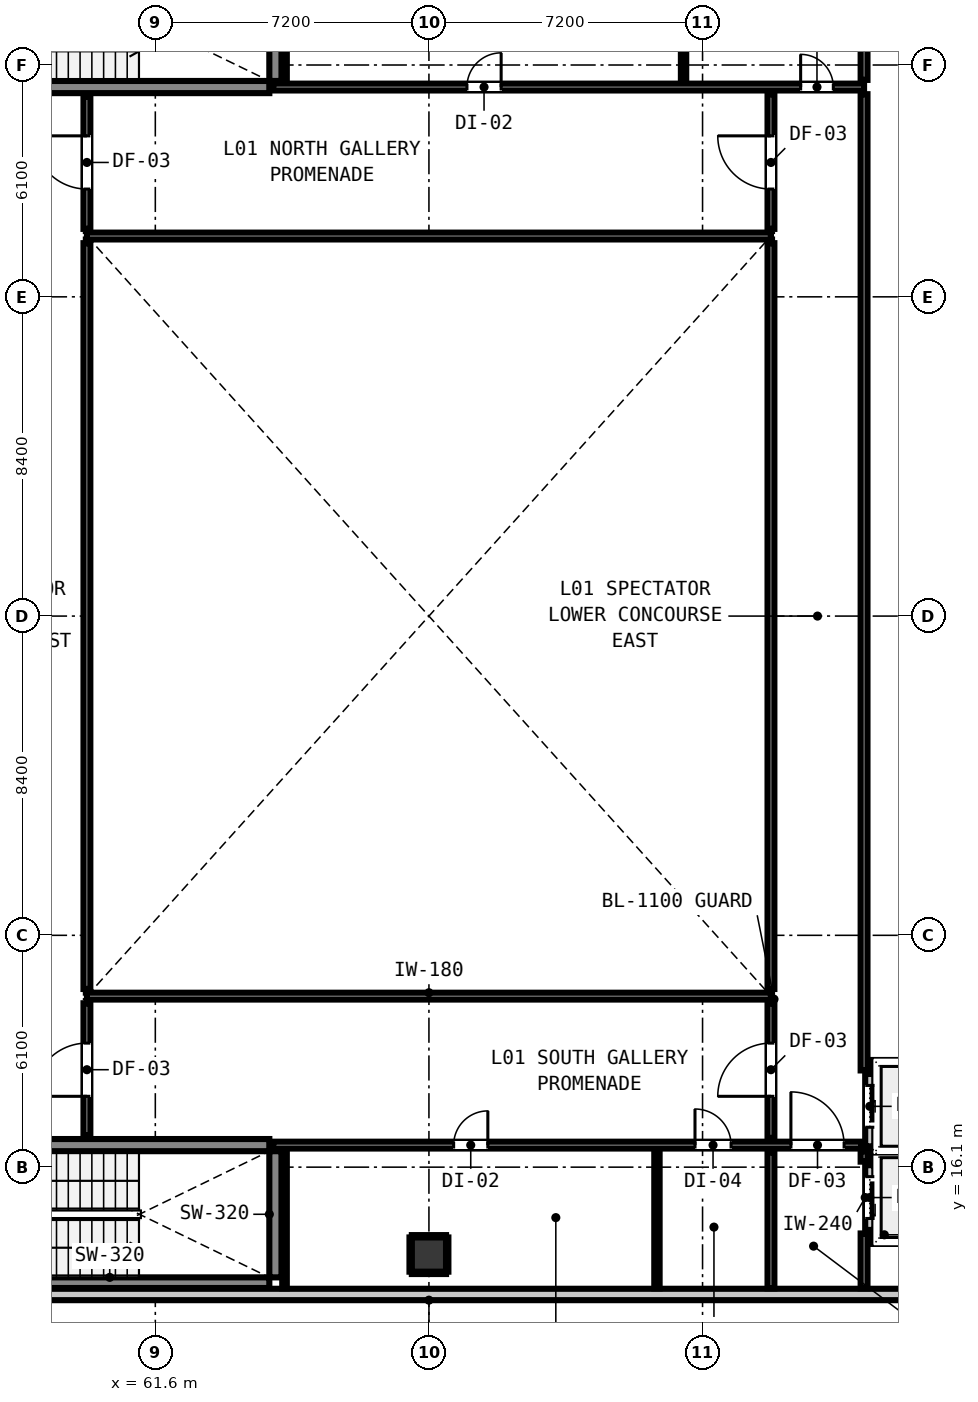
"""IFC4 building model, lengths in metres.
Left out: names, types, materials, properties, quantities, classifications, styles, units other than length and angle.
Written with IfcOpenShell. Run it as: python <this file> out.ifc"""

import sys

from ifc_helpers import new_model, si_unit, direction, frame, frame_2d, origin, origin_2d, place, context, subcontext, project, spatial, rectangle, circle, extrude, element, fill, save


model = new_model("IFC4")
c1 = context("Model", 3, precision=1e-05, world=origin(), true_north=direction((0.0, 1.0)))
c2 = subcontext(c1, "Body", "Model", "MODEL_VIEW")
j1 = project(units=[si_unit("LENGTHUNIT", "METRE"), si_unit("PLANEANGLEUNIT", "RADIAN")], contexts=[c1])
p1 = place(None, origin())
s1 = spatial("IfcSite", under=j1, at=p1, CompositionType="ELEMENT")
p2 = place(p1, origin())
s2 = spatial("IfcBuilding", under=s1, at=p2, CompositionType="ELEMENT")
p3 = place(p2, frame((0.0, 0.0, 5.2)))
s3 = spatial("IfcBuildingStorey", under=s2, at=p3, CompositionType="ELEMENT", Elevation=5.2)
p4 = place(p3, frame((64.76, 13.2, 0.0), z_axis=(0.0, 0.0, 1.0), x_axis=(0.0, 1.0, 0.0)))
e1 = element("IfcWall", 1, at=p4, inside=s3, PredefinedType="SHEAR", context=c2, shape_type="SweptSolid", body=[
    extrude(rectangle(XDim=3.32, YDim=0.32, at=frame_2d((1.66, 0.0))), origin(), (0.0, 0.0, 1.0), 4.2),
])
p5 = place(p3, frame((56.2, 13.06, 0.0), z_axis=(0.0, 0.0, 1.0), x_axis=(1.0, 0.0, 0.0)))
e2 = element("IfcWall", 2, at=p5, inside=s3, PredefinedType="SHEAR", context=c2, shape_type="SweptSolid", body=[
    extrude(rectangle(XDim=8.4, YDim=0.28, at=frame_2d((4.2, 0.0))), origin(), (0.0, 0.0, 1.0), 4.2),
])
p6 = place(p3, frame((56.2, 16.68, 0.0), z_axis=(0.0, 0.0, 1.0), x_axis=(1.0, 0.0, 0.0)))
e3 = element("IfcWall", 3, at=p6, inside=s3, PredefinedType="SHEAR", context=c2, shape_type="SweptSolid", body=[
    extrude(rectangle(XDim=8.4, YDim=0.32, at=frame_2d((4.2, 0.0))), origin(), (0.0, 0.0, 1.0), 4.2),
])
p7 = place(p6, frame((0.23, 0.0, 0.0)))
e4 = element("IfcOpeningElement", 4, at=p7, cuts=e3, PredefinedType="OPENING", context=c2, shape_type="SweptSolid", body=[
    extrude(rectangle(XDim=1.1, YDim=2.15, at=frame_2d((0.55, 1.075))), frame((0.0, 0.17, 0.0), z_axis=(0.0, -1.0, 0.0), x_axis=(1.0, 0.0, 0.0)), (0.0, 0.0, 1.0), 0.34),
])
p8 = place(p3, frame((64.76, 44.68, 0.0), z_axis=(0.0, 0.0, 1.0), x_axis=(0.0, 1.0, 0.0)))
e5 = element("IfcWall", 5, at=p8, inside=s3, PredefinedType="SHEAR", context=c2, shape_type="SweptSolid", body=[
    extrude(rectangle(XDim=3.32, YDim=0.32, at=frame_2d((1.66, 0.0))), origin(), (0.0, 0.0, 1.0), 4.2),
])
p9 = place(p3, frame((56.2, 44.52, 0.0), z_axis=(0.0, 0.0, 1.0), x_axis=(1.0, 0.0, 0.0)))
e6 = element("IfcWall", 6, at=p9, inside=s3, PredefinedType="SHEAR", context=c2, shape_type="SweptSolid", body=[
    extrude(rectangle(XDim=8.4, YDim=0.32, at=frame_2d((4.2, 0.0))), origin(), (0.0, 0.0, 1.0), 4.2),
])
p10 = place(p9, frame((0.23, 0.0, 0.0)))
e7 = element("IfcOpeningElement", 7, at=p10, cuts=e6, PredefinedType="OPENING", context=c2, shape_type="SweptSolid", body=[
    extrude(rectangle(XDim=1.1, YDim=2.15, at=frame_2d((0.55, 1.075))), frame((0.0, 0.17, 0.0), z_axis=(0.0, -1.0, 0.0), x_axis=(1.0, 0.0, 0.0)), (0.0, 0.0, 1.0), 0.34),
])
p11 = place(p3, frame((68.8, 13.8, 0.0), z_axis=(0.0, 0.0, 1.0), x_axis=(1.0, 0.0, 0.0)))
e8 = element("IfcColumn", 8, at=p11, inside=s3, PredefinedType="COLUMN", context=c2, shape_type="SweptSolid", body=[
    extrude(circle(Radius=0.45, at=origin_2d()), origin(), (0.0, 0.0, 1.0), 4.2),
])
p12 = place(p3, frame((83.05, 12.75, 0.0), z_axis=(0.0, 0.0, 1.0), x_axis=(-1.0, 0.0, 0.0)))
e9 = element("IfcWall", 9, at=p12, inside=s3, PredefinedType="STANDARD", context=c2, shape_type="SweptSolid", body=[
    extrude(rectangle(XDim=28.5, YDim=0.3, at=frame_2d((14.25, 0.0))), origin(), (0.0, 0.0, 1.0), 3.92),
])
p13 = place(p3, frame((80.4, 14.2, 0.0), z_axis=(0.0, 0.0, 1.0), x_axis=(1.0, 0.0, 0.0)))
e10 = element("IfcWall", 10, at=p13, inside=s3, PredefinedType="PARTITIONING", context=c2, shape_type="SweptSolid", body=[
    extrude(rectangle(XDim=0.768, YDim=0.24, at=frame_2d((0.384, 0.0))), origin(), (0.0, 0.0, 1.0), 3.155),
])
p14 = place(p3, frame((80.4, 16.4, 0.0), z_axis=(0.0, 0.0, 1.0), x_axis=(1.0, 0.0, 0.0)))
e11 = element("IfcWall", 11, at=p14, inside=s3, PredefinedType="PARTITIONING", context=c2, shape_type="SweptSolid", body=[
    extrude(rectangle(XDim=2.2, YDim=0.24, at=frame_2d((1.1, 0.0))), origin(), (0.0, 0.0, 1.0), 3.92),
])
p15 = place(p3, frame((80.4, 14.448, 0.0), z_axis=(0.0, 0.0, 1.0), x_axis=(0.0, 1.0, 0.0)))
e12 = element("IfcWall", 12, at=p15, inside=s3, PredefinedType="PARTITIONING", context=c2, shape_type="SweptSolid", body=[
    extrude(rectangle(XDim=1.704, YDim=0.24, at=frame_2d((0.852, 0.0))), origin(), (0.0, 0.0, 1.0), 3.92),
])
p16 = place(p15, frame((0.302, 0.0, 0.0)))
e13 = element("IfcOpeningElement", 13, at=p16, cuts=e12, PredefinedType="OPENING", context=c2, shape_type="SweptSolid", body=[
    extrude(rectangle(XDim=1.1, YDim=2.15, at=frame_2d((0.55, 1.075))), frame((0.0, 0.13, 0.0), z_axis=(0.0, -1.0, 0.0), x_axis=(1.0, 0.0, 0.0)), (0.0, 0.0, 1.0), 0.26),
])
p17 = place(p3, frame((80.4, 18.8, 0.0), z_axis=(0.0, 0.0, 1.0), x_axis=(1.0, 0.0, 0.0)))
e14 = element("IfcWall", 14, at=p17, inside=s3, PredefinedType="PARTITIONING", context=c2, shape_type="SweptSolid", body=[
    extrude(rectangle(XDim=2.2, YDim=0.24, at=frame_2d((1.1, 0.0))), origin(), (0.0, 0.0, 1.0), 3.92),
])
p18 = place(p3, frame((80.4, 16.648, 0.0), z_axis=(0.0, 0.0, 1.0), x_axis=(0.0, 1.0, 0.0)))
e15 = element("IfcWall", 15, at=p18, inside=s3, PredefinedType="PARTITIONING", context=c2, shape_type="SweptSolid", body=[
    extrude(rectangle(XDim=1.904, YDim=0.24, at=frame_2d((0.952, 0.0))), origin(), (0.0, 0.0, 1.0), 3.92),
])
p19 = place(p18, frame((0.502, 0.0, 0.0)))
e16 = element("IfcOpeningElement", 16, at=p19, cuts=e15, PredefinedType="OPENING", context=c2, shape_type="SweptSolid", body=[
    extrude(rectangle(XDim=1.1, YDim=2.15, at=frame_2d((0.55, 1.075))), frame((0.0, 0.13, 0.0), z_axis=(0.0, -1.0, 0.0), x_axis=(1.0, 0.0, 0.0)), (0.0, 0.0, 1.0), 0.26),
])
p20 = place(p3, frame((64.7, 16.68, 0.0), z_axis=(0.0, 0.0, 1.0), x_axis=(1.0, 0.0, 0.0)))
e17 = element("IfcWall", 17, at=p20, inside=s3, PredefinedType="PARTITIONING", context=c2, shape_type="SweptSolid", body=[
    extrude(rectangle(XDim=15.482, YDim=0.18, at=frame_2d((7.741, 0.0))), origin(), (0.0, 0.0, 1.0), 3.92),
])
p21 = place(p20, frame((13.625, 0.0, 0.0)))
e18 = element("IfcOpeningElement", 18, at=p21, cuts=e17, PredefinedType="OPENING", context=c2, shape_type="SweptSolid", body=[
    extrude(rectangle(XDim=1.4, YDim=2.15, at=frame_2d((0.7, 1.075))), frame((0.0, 0.1, 0.0), z_axis=(0.0, -1.0, 0.0), x_axis=(1.0, 0.0, 0.0)), (0.0, 0.0, 1.0), 0.2),
])
p22 = place(p20, frame((4.75, 0.0, 0.0)))
e19 = element("IfcOpeningElement", 19, at=p22, cuts=e17, PredefinedType="OPENING", context=c2, shape_type="SweptSolid", body=[
    extrude(rectangle(XDim=0.9, YDim=2.1, at=frame_2d((0.45, 1.05))), frame((0.0, 0.1, 0.0), z_axis=(0.0, -1.0, 0.0), x_axis=(1.0, 0.0, 0.0)), (0.0, 0.0, 1.0), 0.2),
])
p23 = place(p20, frame((11.101, 0.0, 0.0)))
e20 = element("IfcOpeningElement", 20, at=p23, cuts=e17, PredefinedType="OPENING", context=c2, shape_type="SweptSolid", body=[
    extrude(rectangle(XDim=0.95, YDim=2.1, at=frame_2d((0.475, 1.05))), frame((0.0, 0.1, 0.0), z_axis=(0.0, -1.0, 0.0), x_axis=(1.0, 0.0, 0.0)), (0.0, 0.0, 1.0), 0.2),
])
for number, where, z_axis, x_axis in (
    (21, (59.8, 20.6, 0.0), (0.0, 0.0, 1.0), (1.0, 0.0, 0.0)),
    (22, (59.8, 40.6, 0.0), (0.0, 0.0, 1.0), (1.0, 0.0, 0.0)),
):
    element("IfcWall", number, at=place(p3, frame(where, z_axis=z_axis, x_axis=x_axis)), inside=s3, PredefinedType="PARTITIONING", context=c2, shape_type="SweptSolid", body=[
        extrude(rectangle(XDim=18.0, YDim=0.18, at=frame_2d((9.0, 0.0))), origin(), (0.0, 0.0, 1.0), 3.92),
    ])
p24 = place(p3, frame((64.7, 44.52, 0.0), z_axis=(0.0, 0.0, 1.0), x_axis=(1.0, 0.0, 0.0)))
e23 = element("IfcWall", 23, at=p24, inside=s3, PredefinedType="PARTITIONING", context=c2, shape_type="SweptSolid", body=[
    extrude(rectangle(XDim=15.55, YDim=0.18, at=frame_2d((7.775, 0.0))), origin(), (0.0, 0.0, 1.0), 3.92),
])
p25 = place(p24, frame((5.1, 0.0, 0.0)))
e24 = element("IfcOpeningElement", 24, at=p25, cuts=e23, PredefinedType="OPENING", context=c2, shape_type="SweptSolid", body=[
    extrude(rectangle(XDim=0.9, YDim=2.1, at=frame_2d((0.45, 1.05))), frame((0.0, 0.1, 0.0), z_axis=(0.0, -1.0, 0.0), x_axis=(1.0, 0.0, 0.0)), (0.0, 0.0, 1.0), 0.2),
])
p26 = place(p24, frame((13.881, 0.0, 0.0)))
e25 = element("IfcOpeningElement", 25, at=p26, cuts=e23, PredefinedType="OPENING", context=c2, shape_type="SweptSolid", body=[
    extrude(rectangle(XDim=0.86, YDim=2.02, at=frame_2d((0.43, 1.01))), frame((0.0, 0.1, 0.0), z_axis=(0.0, -1.0, 0.0), x_axis=(1.0, 0.0, 0.0)), (0.0, 0.0, 1.0), 0.2),
])
p27 = place(p3, frame((59.8, 16.94, 0.0), z_axis=(0.0, 0.0, 1.0), x_axis=(0.0, 1.0, 0.0)))
e26 = element("IfcWall", 26, at=p27, inside=s3, PredefinedType="PARTITIONING", context=c2, shape_type="SweptSolid", body=[
    extrude(rectangle(XDim=3.472, YDim=0.18, at=frame_2d((1.736, 0.0))), origin(), (0.0, 0.0, 1.0), 3.92),
])
p28 = place(p27, frame((1.024, 0.0, 0.0)))
e27 = element("IfcOpeningElement", 27, at=p28, cuts=e26, PredefinedType="OPENING", context=c2, shape_type="SweptSolid", body=[
    extrude(rectangle(XDim=1.4, YDim=2.15, at=frame_2d((0.7, 1.075))), frame((0.0, 0.1, 0.0), z_axis=(0.0, -1.0, 0.0), x_axis=(1.0, 0.0, 0.0)), (0.0, 0.0, 1.0), 0.2),
])
p29 = place(p3, frame((59.8, 20.788, 0.0), z_axis=(0.0, 0.0, 1.0), x_axis=(0.0, 1.0, 0.0)))
e28 = element("IfcWall", 28, at=p29, inside=s3, PredefinedType="PARTITIONING", context=c2, shape_type="SweptSolid", body=[
    extrude(rectangle(XDim=19.624, YDim=0.18, at=frame_2d((9.812, 0.0))), origin(), (0.0, 0.0, 1.0), 3.92),
])
p30 = place(p3, frame((59.8, 40.788, 0.0), z_axis=(0.0, 0.0, 1.0), x_axis=(0.0, 1.0, 0.0)))
e29 = element("IfcWall", 29, at=p30, inside=s3, PredefinedType="PARTITIONING", context=c2, shape_type="SweptSolid", body=[
    extrude(rectangle(XDim=3.472, YDim=0.18, at=frame_2d((1.736, 0.0))), origin(), (0.0, 0.0, 1.0), 3.92),
])
p31 = place(p30, frame((1.048, 0.0, 0.0)))
e30 = element("IfcOpeningElement", 30, at=p31, cuts=e29, PredefinedType="OPENING", context=c2, shape_type="SweptSolid", body=[
    extrude(rectangle(XDim=1.4, YDim=2.15, at=frame_2d((0.7, 1.075))), frame((0.0, 0.1, 0.0), z_axis=(0.0, -1.0, 0.0), x_axis=(1.0, 0.0, 0.0)), (0.0, 0.0, 1.0), 0.2),
])
p32 = place(p3, frame((77.8, 12.912, 0.0), z_axis=(0.0, 0.0, 1.0), x_axis=(0.0, 1.0, 0.0)))
e31 = element("IfcWall", 31, at=p32, inside=s3, PredefinedType="PARTITIONING", context=c2, shape_type="SweptSolid", body=[
    extrude(rectangle(XDim=3.58, YDim=0.18, at=frame_2d((1.79, 0.0))), origin(), (0.0, 0.0, 1.0), 3.92),
])
p33 = place(p3, frame((77.8, 16.868, 0.0), z_axis=(0.0, 0.0, 1.0), x_axis=(0.0, 1.0, 0.0)))
e32 = element("IfcWall", 32, at=p33, inside=s3, PredefinedType="PARTITIONING", context=c2, shape_type="SweptSolid", body=[
    extrude(rectangle(XDim=3.544, YDim=0.18, at=frame_2d((1.772, 0.0))), origin(), (0.0, 0.0, 1.0), 3.92),
])
p34 = place(p33, frame((1.096, 0.0, 0.0)))
e33 = element("IfcOpeningElement", 33, at=p34, cuts=e32, PredefinedType="OPENING", context=c2, shape_type="SweptSolid", body=[
    extrude(rectangle(XDim=1.4, YDim=2.15, at=frame_2d((0.7, 1.075))), frame((0.0, 0.1, 0.0), z_axis=(0.0, -1.0, 0.0), x_axis=(1.0, 0.0, 0.0)), (0.0, 0.0, 1.0), 0.2),
])
p35 = place(p3, frame((77.8, 20.788, 0.0), z_axis=(0.0, 0.0, 1.0), x_axis=(0.0, 1.0, 0.0)))
e34 = element("IfcWall", 34, at=p35, inside=s3, PredefinedType="PARTITIONING", context=c2, shape_type="SweptSolid", body=[
    extrude(rectangle(XDim=19.624, YDim=0.18, at=frame_2d((9.812, 0.0))), origin(), (0.0, 0.0, 1.0), 3.92),
])
p36 = place(p3, frame((77.8, 40.788, 0.0), z_axis=(0.0, 0.0, 1.0), x_axis=(0.0, 1.0, 0.0)))
e35 = element("IfcWall", 35, at=p36, inside=s3, PredefinedType="PARTITIONING", context=c2, shape_type="SweptSolid", body=[
    extrude(rectangle(XDim=3.544, YDim=0.18, at=frame_2d((1.772, 0.0))), origin(), (0.0, 0.0, 1.0), 3.92),
])
p37 = place(p36, frame((1.048, 0.0, 0.0)))
e36 = element("IfcOpeningElement", 36, at=p37, cuts=e35, PredefinedType="OPENING", context=c2, shape_type="SweptSolid", body=[
    extrude(rectangle(XDim=1.4, YDim=2.15, at=frame_2d((0.7, 1.075))), frame((0.0, 0.1, 0.0), z_axis=(0.0, -1.0, 0.0), x_axis=(1.0, 0.0, 0.0)), (0.0, 0.0, 1.0), 0.2),
])
p38 = place(p3, frame((80.25, 12.912, 0.0), z_axis=(0.0, 0.0, 1.0), x_axis=(0.0, 1.0, 0.0)))
e37 = element("IfcWall", 37, at=p38, inside=s3, PredefinedType="PARTITIONING", context=c2, shape_type="SweptSolid", body=[
    extrude(rectangle(XDim=1.443, YDim=0.18, at=frame_2d((0.721, 0.0))), origin(), (0.0, 0.0, 1.0), 3.92),
])
p39 = place(p3, frame((80.25, 16.245, 0.0), z_axis=(0.0, 0.0, 1.0), x_axis=(0.0, 1.0, 0.0)))
e38 = element("IfcWall", 38, at=p39, inside=s3, PredefinedType="PARTITIONING", context=c2, shape_type="SweptSolid", body=[
    extrude(rectangle(XDim=0.275, YDim=0.18, at=frame_2d((0.137, 0.0))), origin(), (0.0, 0.0, 1.0), 3.92),
])
p40 = place(p3, frame((80.25, 18.645, 0.0), z_axis=(0.0, 0.0, 1.0), x_axis=(0.0, 1.0, 0.0)))
e39 = element("IfcWall", 39, at=p40, inside=s3, PredefinedType="PARTITIONING", context=c2, shape_type="SweptSolid", body=[
    extrude(rectangle(XDim=25.687, YDim=0.18, at=frame_2d((12.844, 0.0))), origin(), (0.0, 0.0, 1.0), 3.92),
])
p41 = place(p3, frame((80.25, 44.708, 0.0), z_axis=(0.0, 0.0, 1.0), x_axis=(0.0, 1.0, 0.0)))
e40 = element("IfcWall", 40, at=p41, inside=s3, PredefinedType="PARTITIONING", context=c2, shape_type="SweptSolid", body=[
    extrude(rectangle(XDim=3.58, YDim=0.18, at=frame_2d((1.79, 0.0))), origin(), (0.0, 0.0, 1.0), 3.92),
])
p42 = place(p3, frame((74.8, 12.912, 0.0), z_axis=(0.0, 0.0, 1.0), x_axis=(0.0, 1.0, 0.0)))
e41 = element("IfcWall", 41, at=p42, inside=s3, PredefinedType="PARTITIONING", context=c2, shape_type="SweptSolid", body=[
    extrude(rectangle(XDim=3.6, YDim=0.14, at=frame_2d((1.8, 0.0))), origin(), (0.0, 0.0, 1.0), 3.92),
])
p43 = place(p3, frame((75.5, 44.688, 0.0), z_axis=(0.0, 0.0, 1.0), x_axis=(0.0, 1.0, 0.0)))
e42 = element("IfcWall", 42, at=p43, inside=s3, PredefinedType="PARTITIONING", context=c2, shape_type="SweptSolid", body=[
    extrude(rectangle(XDim=3.6, YDim=0.14, at=frame_2d((1.8, 0.0))), origin(), (0.0, 0.0, 1.0), 3.92),
])
p44 = place(p3, frame((65.0, 12.912, 0.0), z_axis=(0.0, 0.0, 1.0), x_axis=(0.0, 1.0, 0.0)))
e43 = element("IfcWall", 43, at=p44, inside=s3, PredefinedType="PARTITIONING", context=c2, shape_type="SweptSolid", body=[
    extrude(rectangle(XDim=3.61, YDim=0.12, at=frame_2d((1.805, 0.0))), origin(), (0.0, 0.0, 1.0), 3.92),
])
p45 = place(p3, frame((65.0, 44.678, 0.0), z_axis=(0.0, 0.0, 1.0), x_axis=(0.0, 1.0, 0.0)))
e44 = element("IfcWall", 44, at=p45, inside=s3, PredefinedType="PARTITIONING", context=c2, shape_type="SweptSolid", body=[
    extrude(rectangle(XDim=3.61, YDim=0.12, at=frame_2d((1.805, 0.0))), origin(), (0.0, 0.0, 1.0), 3.92),
])
for number, where, z_axis, x_axis in (
    (45, (68.35, 13.318, 0.0), (0.0, 0.0, 1.0), (1.0, 0.0, 0.0)),
    (46, (68.35, 14.282, 0.0), (0.0, 0.0, 1.0), (1.0, 0.0, 0.0)),
    (47, (68.318, 13.35, 0.0), (0.0, 0.0, 1.0), (0.0, 1.0, 0.0)),
    (48, (69.282, 13.35, 0.0), (0.0, 0.0, 1.0), (0.0, 1.0, 0.0)),
):
    element("IfcWall", number, at=place(p3, frame(where, z_axis=z_axis, x_axis=x_axis)), inside=s3, PredefinedType="PARTITIONING", context=c2, shape_type="SweptSolid", body=[
        extrude(rectangle(XDim=0.9, YDim=0.06, at=frame_2d((0.45, 0.0))), origin(), (0.0, 0.0, 1.0), 1.45),
    ])
p46 = place(p16, origin())
e49 = element("IfcDoor", 49, at=p46, inside=s3, OperationType="SLIDING_TO_LEFT", PredefinedType="DOOR", context=c2, shape_type="SweptSolid", body=[
    extrude(rectangle(XDim=1.1, YDim=2.15, at=frame_2d((0.55, 1.075))), frame((0.0, 0.025, 0.0), z_axis=(0.0, -1.0, 0.0), x_axis=(1.0, 0.0, 0.0)), (0.0, 0.0, 1.0), 0.05),
])
fill(e13, e49)
p47 = place(p19, origin())
e50 = element("IfcDoor", 50, at=p47, inside=s3, OperationType="SLIDING_TO_RIGHT", PredefinedType="DOOR", context=c2, shape_type="SweptSolid", body=[
    extrude(rectangle(XDim=1.1, YDim=2.15, at=frame_2d((0.55, 1.075))), frame((0.0, 0.025, 0.0), z_axis=(0.0, -1.0, 0.0), x_axis=(1.0, 0.0, 0.0)), (0.0, 0.0, 1.0), 0.05),
])
fill(e16, e50)
p48 = place(p28, origin())
e51 = element("IfcDoor", 51, at=p48, inside=s3, OperationType="SINGLE_SWING_LEFT", PredefinedType="DOOR", context=c2, shape_type="SweptSolid", body=[
    extrude(rectangle(XDim=1.4, YDim=2.15, at=frame_2d((0.7, 1.075))), frame((0.0, 0.025, 0.0), z_axis=(0.0, -1.0, 0.0), x_axis=(1.0, 0.0, 0.0)), (0.0, 0.0, 1.0), 0.05),
])
fill(e27, e51)
p49 = place(p31, origin())
e52 = element("IfcDoor", 52, at=p49, inside=s3, OperationType="SINGLE_SWING_RIGHT", PredefinedType="DOOR", context=c2, shape_type="SweptSolid", body=[
    extrude(rectangle(XDim=1.4, YDim=2.15, at=frame_2d((0.7, 1.075))), frame((0.0, 0.025, 0.0), z_axis=(0.0, -1.0, 0.0), x_axis=(1.0, 0.0, 0.0)), (0.0, 0.0, 1.0), 0.05),
])
fill(e30, e52)
p50 = place(p34, origin())
e53 = element("IfcDoor", 53, at=p50, inside=s3, OperationType="SINGLE_SWING_LEFT", PredefinedType="DOOR", context=c2, shape_type="SweptSolid", body=[
    extrude(rectangle(XDim=1.4, YDim=2.15, at=frame_2d((0.7, 1.075))), frame((0.0, 0.025, 0.0), z_axis=(0.0, -1.0, 0.0), x_axis=(1.0, 0.0, 0.0)), (0.0, 0.0, 1.0), 0.05),
])
fill(e33, e53)
p51 = place(p37, origin())
e54 = element("IfcDoor", 54, at=p51, inside=s3, OperationType="SINGLE_SWING_RIGHT", PredefinedType="DOOR", context=c2, shape_type="SweptSolid", body=[
    extrude(rectangle(XDim=1.4, YDim=2.15, at=frame_2d((0.7, 1.075))), frame((0.0, 0.025, 0.0), z_axis=(0.0, -1.0, 0.0), x_axis=(1.0, 0.0, 0.0)), (0.0, 0.0, 1.0), 0.05),
])
fill(e36, e54)
p52 = place(p21, origin())
e55 = element("IfcDoor", 55, at=p52, inside=s3, OperationType="SINGLE_SWING_LEFT", PredefinedType="DOOR", context=c2, shape_type="SweptSolid", body=[
    extrude(rectangle(XDim=1.4, YDim=2.15, at=frame_2d((0.7, 1.075))), frame((0.0, 0.025, 0.0), z_axis=(0.0, -1.0, 0.0), x_axis=(1.0, 0.0, 0.0)), (0.0, 0.0, 1.0), 0.05),
])
fill(e18, e55)
p53 = place(p22, origin())
e56 = element("IfcDoor", 56, at=p53, inside=s3, OperationType="SINGLE_SWING_RIGHT", PredefinedType="DOOR", context=c2, shape_type="SweptSolid", body=[
    extrude(rectangle(XDim=0.9, YDim=2.1, at=frame_2d((0.45, 1.05))), frame((0.0, 0.025, 0.0), z_axis=(0.0, -1.0, 0.0), x_axis=(1.0, 0.0, 0.0)), (0.0, 0.0, 1.0), 0.05),
])
fill(e19, e56)
p54 = place(p23, origin())
e57 = element("IfcDoor", 57, at=p54, inside=s3, OperationType="SINGLE_SWING_LEFT", PredefinedType="DOOR", context=c2, shape_type="SweptSolid", body=[
    extrude(rectangle(XDim=0.95, YDim=2.1, at=frame_2d((0.475, 1.05))), frame((0.0, 0.025, 0.0), z_axis=(0.0, -1.0, 0.0), x_axis=(1.0, 0.0, 0.0)), (0.0, 0.0, 1.0), 0.05),
])
fill(e20, e57)
p55 = place(p25, origin())
e58 = element("IfcDoor", 58, at=p55, inside=s3, OperationType="SINGLE_SWING_RIGHT", PredefinedType="DOOR", context=c2, shape_type="SweptSolid", body=[
    extrude(rectangle(XDim=0.9, YDim=2.1, at=frame_2d((0.45, 1.05))), frame((0.0, 0.025, 0.0), z_axis=(0.0, -1.0, 0.0), x_axis=(1.0, 0.0, 0.0)), (0.0, 0.0, 1.0), 0.05),
])
fill(e24, e58)
p56 = place(p26, origin())
e59 = element("IfcDoor", 59, at=p56, inside=s3, OperationType="SINGLE_SWING_LEFT", PredefinedType="DOOR", context=c2, shape_type="SweptSolid", body=[
    extrude(rectangle(XDim=0.86, YDim=2.02, at=frame_2d((0.43, 1.01))), frame((0.0, 0.025, 0.0), z_axis=(0.0, -1.0, 0.0), x_axis=(1.0, 0.0, 0.0)), (0.0, 0.0, 1.0), 0.05),
])
fill(e25, e59)
save(model, sys.argv[1])
